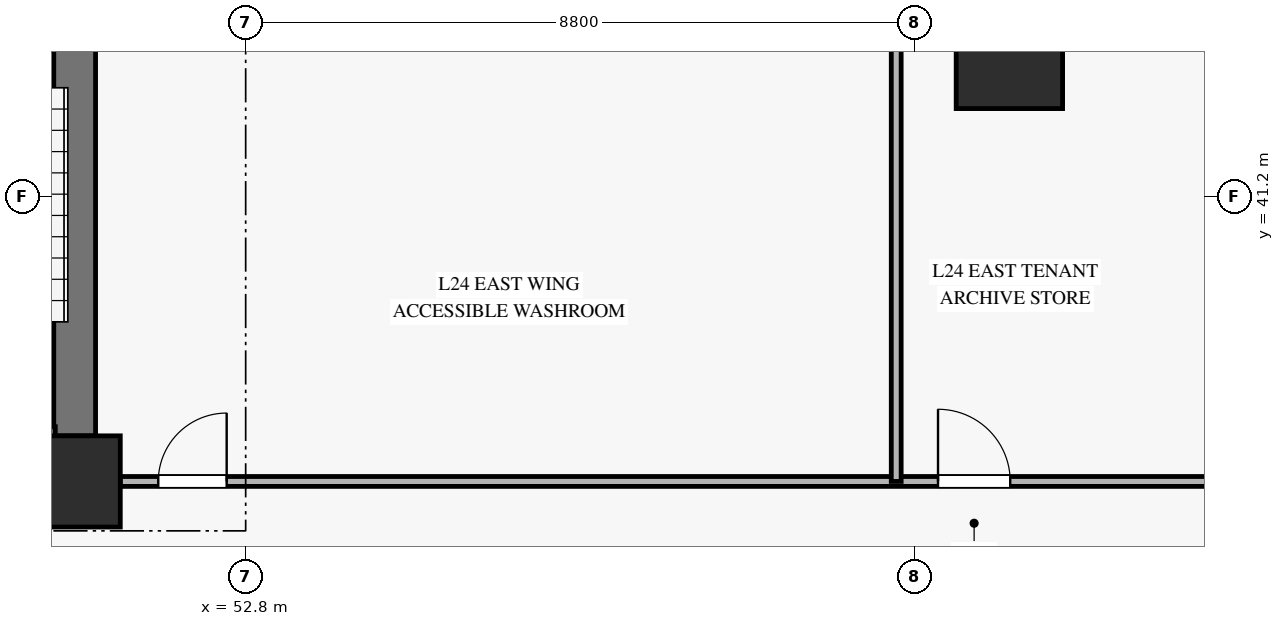
"""IFC4 building model, lengths in metres.
Left out: names, types, materials, properties, quantities, classifications, styles, units other than length and angle.
Written with IfcOpenShell. Run it as: python <this file> out.ifc"""

import sys

from ifc_helpers import new_model, si_unit, direction, frame, frame_2d, origin, origin_2d, place, context, subcontext, project, spatial, rectangle, hollow_rectangle, extrude, source, transform, mapped, element, fill, save


model = new_model("IFC4")
c1 = context("Model", 3, precision=1e-05, world=origin(), true_north=direction((0.0, 1.0)))
c2 = subcontext(c1, "Body", "Model", "MODEL_VIEW")
j1 = project(units=[si_unit("LENGTHUNIT", "METRE"), si_unit("PLANEANGLEUNIT", "RADIAN")], contexts=[c1])
p1 = place(None, origin())
s1 = spatial("IfcSite", under=j1, at=p1, CompositionType="ELEMENT")
p2 = place(p1, origin())
s2 = spatial("IfcBuilding", under=s1, at=p2, CompositionType="ELEMENT")
p3 = place(p2, frame((0.0, 0.0, 99.7)))
s3 = spatial("IfcBuildingStorey", under=s2, at=p3, CompositionType="ELEMENT", Elevation=99.7)
m1 = source(origin(), c2, "Body", "SweptSolid", [
    extrude(rectangle(XDim=1.2, YDim=1.2, at=origin_2d()), origin(), (0.0, 0.0, 1.0), 3.68),
])
p4 = place(p3, frame((50.55, 37.45, 0.0), z_axis=(0.0, 0.0, 1.0), x_axis=(1.0, 0.0, 0.0)))
e1 = element("IfcColumn", 1, at=p4, inside=s3, PredefinedType="PILASTER", context=c2, shape_type="MappedRepresentation", body=[
    mapped(m1, transform((0.0, 0.0, 0.0), x_axis=(1.0, 0.0, 0.0), y_axis=(0.0, 1.0, 0.0), z_axis=(0.0, 0.0, 1.0), scale=1.0)),
])
p5 = place(p3, frame((50.55, 38.05, 0.0), z_axis=(0.0, 0.0, 1.0), x_axis=(0.0, 1.0, 0.0)))
e2 = element("IfcWall", 2, at=p5, inside=s3, PredefinedType="SHEAR", context=c2, shape_type="SweptSolid", body=[
    extrude(rectangle(XDim=7.9, YDim=0.55, at=frame_2d((3.95, 0.0))), origin(), (0.0, 0.0, 1.0), 3.68),
])
m2 = source(origin(), c2, "Body", "SweptSolid", [
    extrude(hollow_rectangle(XDim=1.4, YDim=1.4, WallThickness=0.065, at=origin_2d()), origin(), (0.0, 0.0, 1.0), 3.68),
])
p6 = place(p3, frame((62.848, 43.056, 0.0), z_axis=(0.0, 0.0, 1.0), x_axis=(1.0, 0.0, 0.0)))
e3 = element("IfcColumn", 3, at=p6, inside=s3, PredefinedType="COLUMN", context=c2, shape_type="MappedRepresentation", body=[
    mapped(m2, transform((0.0, 0.0, 0.0), x_axis=(1.0, 0.0, 0.0), y_axis=(0.0, 1.0, 0.0), z_axis=(0.0, 0.0, 1.0), scale=1.0)),
])
p7 = place(p3, frame((65.891, 43.056, 0.0), z_axis=(0.0, 0.0, 1.0), x_axis=(-0.630273101398, 0.776373503962, 0.0)))
e4 = element("IfcWall", 4, at=p7, inside=s3, PredefinedType="SOLIDWALL", context=c2, shape_type="SweptSolid", body=[
    extrude(rectangle(XDim=4.114, YDim=0.3, at=frame_2d((2.057, 0.0))), origin(), (0.0, 0.0, 1.0), 3.16),
])
p8 = place(p7, frame((1.257, 0.0, 0.45)))
e5 = element("IfcOpeningElement", 5, at=p8, cuts=e4, PredefinedType="OPENING", context=c2, shape_type="SweptSolid", body=[
    extrude(rectangle(XDim=1.6, YDim=2.0, at=frame_2d((0.8, 1.0))), frame((0.0, 0.16, 0.0), z_axis=(0.0, -1.0, 0.0), x_axis=(1.0, 0.0, 0.0)), (0.0, 0.0, 1.0), 0.32),
])
p9 = place(p3, frame((47.44, 38.07, 0.0), z_axis=(0.0, 0.0, 1.0), x_axis=(1.0, 0.0, 0.0)))
e6 = element("IfcWall", 6, at=p9, inside=s3, PredefinedType="SOLIDWALL", context=c2, shape_type="SweptSolid", body=[
    extrude(rectangle(XDim=2.855, YDim=0.2, at=frame_2d((1.427, 0.0))), origin(), (0.0, 0.0, 1.0), 3.9),
])
p10 = place(p3, frame((51.15, 37.45, 0.0), z_axis=(0.0, 0.0, 1.0), x_axis=(1.0, 0.0, 0.0)))
e7 = element("IfcWall", 7, at=p10, inside=s3, PredefinedType="PARTITIONING", context=c2, shape_type="SweptSolid", body=[
    extrude(rectangle(XDim=14.741, YDim=0.13, at=frame_2d((7.371, 0.0))), origin(), (0.0, 0.0, 1.0), 3.165),
])
p11 = place(p10, frame((0.5, 0.0, 0.0)))
e8 = element("IfcOpeningElement", 8, at=p11, cuts=e7, PredefinedType="OPENING", context=c2, shape_type="SweptSolid", body=[
    extrude(rectangle(XDim=0.9, YDim=2.1, at=frame_2d((0.45, 1.05))), frame((0.0, 0.075, 0.0), z_axis=(0.0, -1.0, 0.0), x_axis=(1.0, 0.0, 0.0)), (0.0, 0.0, 1.0), 0.15),
])
p12 = place(p10, frame((10.759, 0.0, 0.0)))
e9 = element("IfcOpeningElement", 9, at=p12, cuts=e7, PredefinedType="OPENING", context=c2, shape_type="SweptSolid", body=[
    extrude(rectangle(XDim=0.95, YDim=2.1, at=frame_2d((0.475, 1.05))), frame((0.0, 0.075, 0.0), z_axis=(0.0, -1.0, 0.0), x_axis=(1.0, 0.0, 0.0)), (0.0, 0.0, 1.0), 0.15),
])
p13 = place(p3, frame((61.359, 37.45, 0.0), z_axis=(0.0, 0.0, 1.0), x_axis=(0.0, 1.0, 0.0)))
e10 = element("IfcWall", 10, at=p13, inside=s3, PredefinedType="PARTITIONING", context=c2, shape_type="SweptSolid", body=[
    extrude(rectangle(XDim=8.8, YDim=0.13, at=frame_2d((4.4, 0.0))), origin(), (0.0, 0.0, 1.0), 3.68),
])
m3 = source(origin(), c2, "Body", "SweptSolid", [
    extrude(rectangle(XDim=0.9, YDim=2.1, at=frame_2d((0.45, 1.05))), frame((0.0, 0.025, 0.0), z_axis=(0.0, -1.0, 0.0), x_axis=(1.0, 0.0, 0.0)), (0.0, 0.0, 1.0), 0.05),
])
p14 = place(p11, origin())
e11 = element("IfcDoor", 11, at=p14, inside=s3, OperationType="SINGLE_SWING_RIGHT", PredefinedType="DOOR", context=c2, shape_type="MappedRepresentation", body=[
    mapped(m3, transform((0.0, 0.0, 0.0), x_axis=(1.0, 0.0, 0.0), y_axis=(0.0, 1.0, 0.0), z_axis=(0.0, 0.0, 1.0), scale=1.0)),
])
fill(e8, e11)
m4 = source(origin(), c2, "Body", "SweptSolid", [
    extrude(rectangle(XDim=0.95, YDim=2.1, at=frame_2d((0.475, 1.05))), frame((0.0, 0.025, 0.0), z_axis=(0.0, -1.0, 0.0), x_axis=(1.0, 0.0, 0.0)), (0.0, 0.0, 1.0), 0.05),
])
p15 = place(p12, origin())
e12 = element("IfcDoor", 12, at=p15, inside=s3, OperationType="SINGLE_SWING_LEFT", PredefinedType="DOOR", context=c2, shape_type="MappedRepresentation", body=[
    mapped(m4, transform((0.0, 0.0, 0.0), x_axis=(1.0, 0.0, 0.0), y_axis=(0.0, 1.0, 0.0), z_axis=(0.0, 0.0, 1.0), scale=1.0)),
])
fill(e9, e12)
save(model, sys.argv[1])
